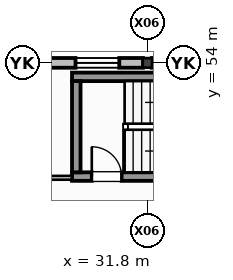
"""IFC4 building model, lengths in metres.
Left out: names, types, materials, properties, quantities, classifications, styles, units other than length and angle.
Written with IfcOpenShell. Run it as: python <this file> out.ifc"""

import sys

from ifc_helpers import new_model, si_unit, direction, frame, frame_2d, origin, origin_2d, place, context, subcontext, project, spatial, rectangle, i_section, extrude, element, fill, save


model = new_model("IFC4")
c1 = context("Model", 3, precision=1e-05, world=origin(), true_north=direction((0.0, 1.0)))
c2 = subcontext(c1, "Body", "Model", "MODEL_VIEW")
j1 = project(units=[si_unit("LENGTHUNIT", "METRE"), si_unit("PLANEANGLEUNIT", "RADIAN")], contexts=[c1])
p1 = place(None, origin())
s1 = spatial("IfcSite", under=j1, at=p1, CompositionType="ELEMENT")
p2 = place(p1, origin())
s2 = spatial("IfcBuilding", under=s1, at=p2, CompositionType="ELEMENT")
p3 = place(p2, frame((0.0, 0.0, 6.0)))
s3 = spatial("IfcBuildingStorey", under=s2, at=p3, CompositionType="ELEMENT", Elevation=6.0)
p4 = place(p3, frame((31.8, 54.0, 0.0), z_axis=(0.0, 0.0, 1.0), x_axis=(1.0, 0.0, 0.0)))
e1 = element("IfcColumn", 1, at=p4, inside=s3, PredefinedType="COLUMN", context=c2, shape_type="SweptSolid", body=[
    extrude(i_section(OverallWidth=0.307, OverallDepth=0.314, WebThickness=0.011, FlangeThickness=0.019, at=origin_2d()), origin(), (0.0, 0.0, 1.0), 4.0),
])
p5 = place(p3, frame((31.655, 54.0, 0.0), z_axis=(0.0, 0.0, 1.0), x_axis=(-1.0, 0.0, 0.0)))
e2 = element("IfcWall", 2, at=p5, inside=s3, PredefinedType="STANDARD", context=c2, shape_type="SweptSolid", body=[
    extrude(rectangle(XDim=5.71, YDim=0.32, at=frame_2d((2.855, 0.0))), origin(), (0.0, 0.0, 1.0), 4.0),
])
p6 = place(p5, frame((0.78, 0.0, 1.18)))
e3 = element("IfcOpeningElement", 3, at=p6, cuts=e2, PredefinedType="OPENING", context=c2, shape_type="SweptSolid", body=[
    extrude(rectangle(XDim=1.44, YDim=1.44, at=frame_2d((0.72, 0.72))), frame((0.0, 0.17, 0.0), z_axis=(0.0, -1.0, 0.0), x_axis=(1.0, 0.0, 0.0)), (0.0, 0.0, 1.0), 0.34),
])
p7 = place(p5, frame((3.546, 0.0, 0.96)))
e4 = element("IfcOpeningElement", 4, at=p7, cuts=e2, PredefinedType="OPENING", context=c2, shape_type="SweptSolid", body=[
    extrude(rectangle(XDim=0.96, YDim=0.96, at=frame_2d((0.48, 0.48))), frame((0.0, 0.17, 0.0), z_axis=(0.0, -1.0, 0.0), x_axis=(1.0, 0.0, 0.0)), (0.0, 0.0, 1.0), 0.34),
])
p8 = place(p3, frame((37.655, 54.0, 0.0), z_axis=(0.0, 0.0, 1.0), x_axis=(-1.0, 0.0, 0.0)))
e5 = element("IfcWall", 5, at=p8, inside=s3, PredefinedType="STANDARD", context=c2, shape_type="SweptSolid", body=[
    extrude(rectangle(XDim=5.71, YDim=0.32, at=frame_2d((2.855, 0.0))), origin(), (0.0, 0.0, 1.0), 4.0),
])
p9 = place(p8, frame((0.586, 0.0, 1.42)))
e6 = element("IfcOpeningElement", 6, at=p9, cuts=e5, PredefinedType="OPENING", context=c2, shape_type="SweptSolid", body=[
    extrude(rectangle(XDim=1.56, YDim=1.56, at=frame_2d((0.78, 0.78))), frame((0.0, 0.17, 0.0), z_axis=(0.0, -1.0, 0.0), x_axis=(1.0, 0.0, 0.0)), (0.0, 0.0, 1.0), 0.34),
])
p10 = place(p8, frame((3.816, 0.0, 1.28)))
e7 = element("IfcOpeningElement", 7, at=p10, cuts=e5, PredefinedType="OPENING", context=c2, shape_type="SweptSolid", body=[
    extrude(rectangle(XDim=1.08, YDim=1.08, at=frame_2d((0.54, 0.54))), frame((0.0, 0.17, 0.0), z_axis=(0.0, -1.0, 0.0), x_axis=(1.0, 0.0, 0.0)), (0.0, 0.0, 1.0), 0.34),
])
p11 = place(p3, frame((29.32, 50.26, 0.0), z_axis=(0.0, 0.0, 1.0), x_axis=(1.0, 0.0, 0.0)))
e8 = element("IfcWall", 8, at=p11, inside=s3, PredefinedType="SHEAR", context=c2, shape_type="SweptSolid", body=[
    extrude(rectangle(XDim=8.16, YDim=0.28, at=frame_2d((4.08, 0.0))), origin(), (0.0, 0.0, 1.0), 3.75),
])
p12 = place(p11, frame((0.65, 0.0, 0.0)))
e9 = element("IfcOpeningElement", 9, at=p12, cuts=e8, PredefinedType="OPENING", context=c2, shape_type="SweptSolid", body=[
    extrude(rectangle(XDim=0.98, YDim=2.15, at=frame_2d((0.49, 1.075))), frame((0.0, 0.15, 0.0), z_axis=(0.0, -1.0, 0.0), x_axis=(1.0, 0.0, 0.0)), (0.0, 0.0, 1.0), 0.3),
])
p13 = place(p3, frame((37.48, 53.54, 0.0), z_axis=(0.0, 0.0, 1.0), x_axis=(-1.0, 0.0, 0.0)))
e10 = element("IfcWall", 10, at=p13, inside=s3, PredefinedType="SHEAR", context=c2, shape_type="SweptSolid", body=[
    extrude(rectangle(XDim=8.16, YDim=0.28, at=frame_2d((4.08, 0.0))), origin(), (0.0, 0.0, 1.0), 3.75),
])
p14 = place(p3, frame((29.46, 53.4, 0.0), z_axis=(0.0, 0.0, 1.0), x_axis=(0.0, -1.0, 0.0)))
e11 = element("IfcWall", 11, at=p14, inside=s3, PredefinedType="SHEAR", context=c2, shape_type="SweptSolid", body=[
    extrude(rectangle(XDim=3.0, YDim=0.28, at=frame_2d((1.5, 0.0))), origin(), (0.0, 0.0, 1.0), 3.75),
])
p15 = place(p3, frame((29.32, 50.22, 0.0), z_axis=(0.0, 0.0, 1.0), x_axis=(-1.0, 0.0, 0.0)))
e12 = element("IfcWall", 12, at=p15, inside=s3, PredefinedType="PARTITIONING", context=c2, shape_type="SweptSolid", body=[
    extrude(rectangle(XDim=19.04, YDim=0.125, at=frame_2d((9.52, 0.0))), origin(), (0.0, 0.0, 1.0), 3.72),
])
p16 = place(p15, frame((8.841, 0.0, 0.0)))
e13 = element("IfcOpeningElement", 13, at=p16, cuts=e12, PredefinedType="OPENING", context=c2, shape_type="SweptSolid", body=[
    extrude(rectangle(XDim=1.58, YDim=2.2, at=frame_2d((0.79, 1.1))), frame((0.0, 0.073, 0.0), z_axis=(0.0, -1.0, 0.0), x_axis=(1.0, 0.0, 0.0)), (0.0, 0.0, 1.0), 0.145),
])
p17 = place(p6, origin())
e14 = element("IfcWindow", 14, at=p17, inside=s3, PartitioningType="SINGLE_PANEL", PredefinedType="WINDOW", context=c2, shape_type="SweptSolid", body=[
    extrude(rectangle(XDim=1.44, YDim=1.44, at=frame_2d((0.72, 0.72))), frame((0.0, 0.03, 0.0), z_axis=(0.0, -1.0, 0.0), x_axis=(1.0, 0.0, 0.0)), (0.0, 0.0, 1.0), 0.06),
])
fill(e3, e14)
p18 = place(p12, origin())
e15 = element("IfcDoor", 15, at=p18, inside=s3, OperationType="SINGLE_SWING_LEFT", PredefinedType="DOOR", context=c2, shape_type="SweptSolid", body=[
    extrude(rectangle(XDim=0.98, YDim=2.15, at=frame_2d((0.49, 1.075))), frame((0.0, 0.025, 0.0), z_axis=(0.0, -1.0, 0.0), x_axis=(1.0, 0.0, 0.0)), (0.0, 0.0, 1.0), 0.05),
])
fill(e9, e15)
save(model, sys.argv[1])
